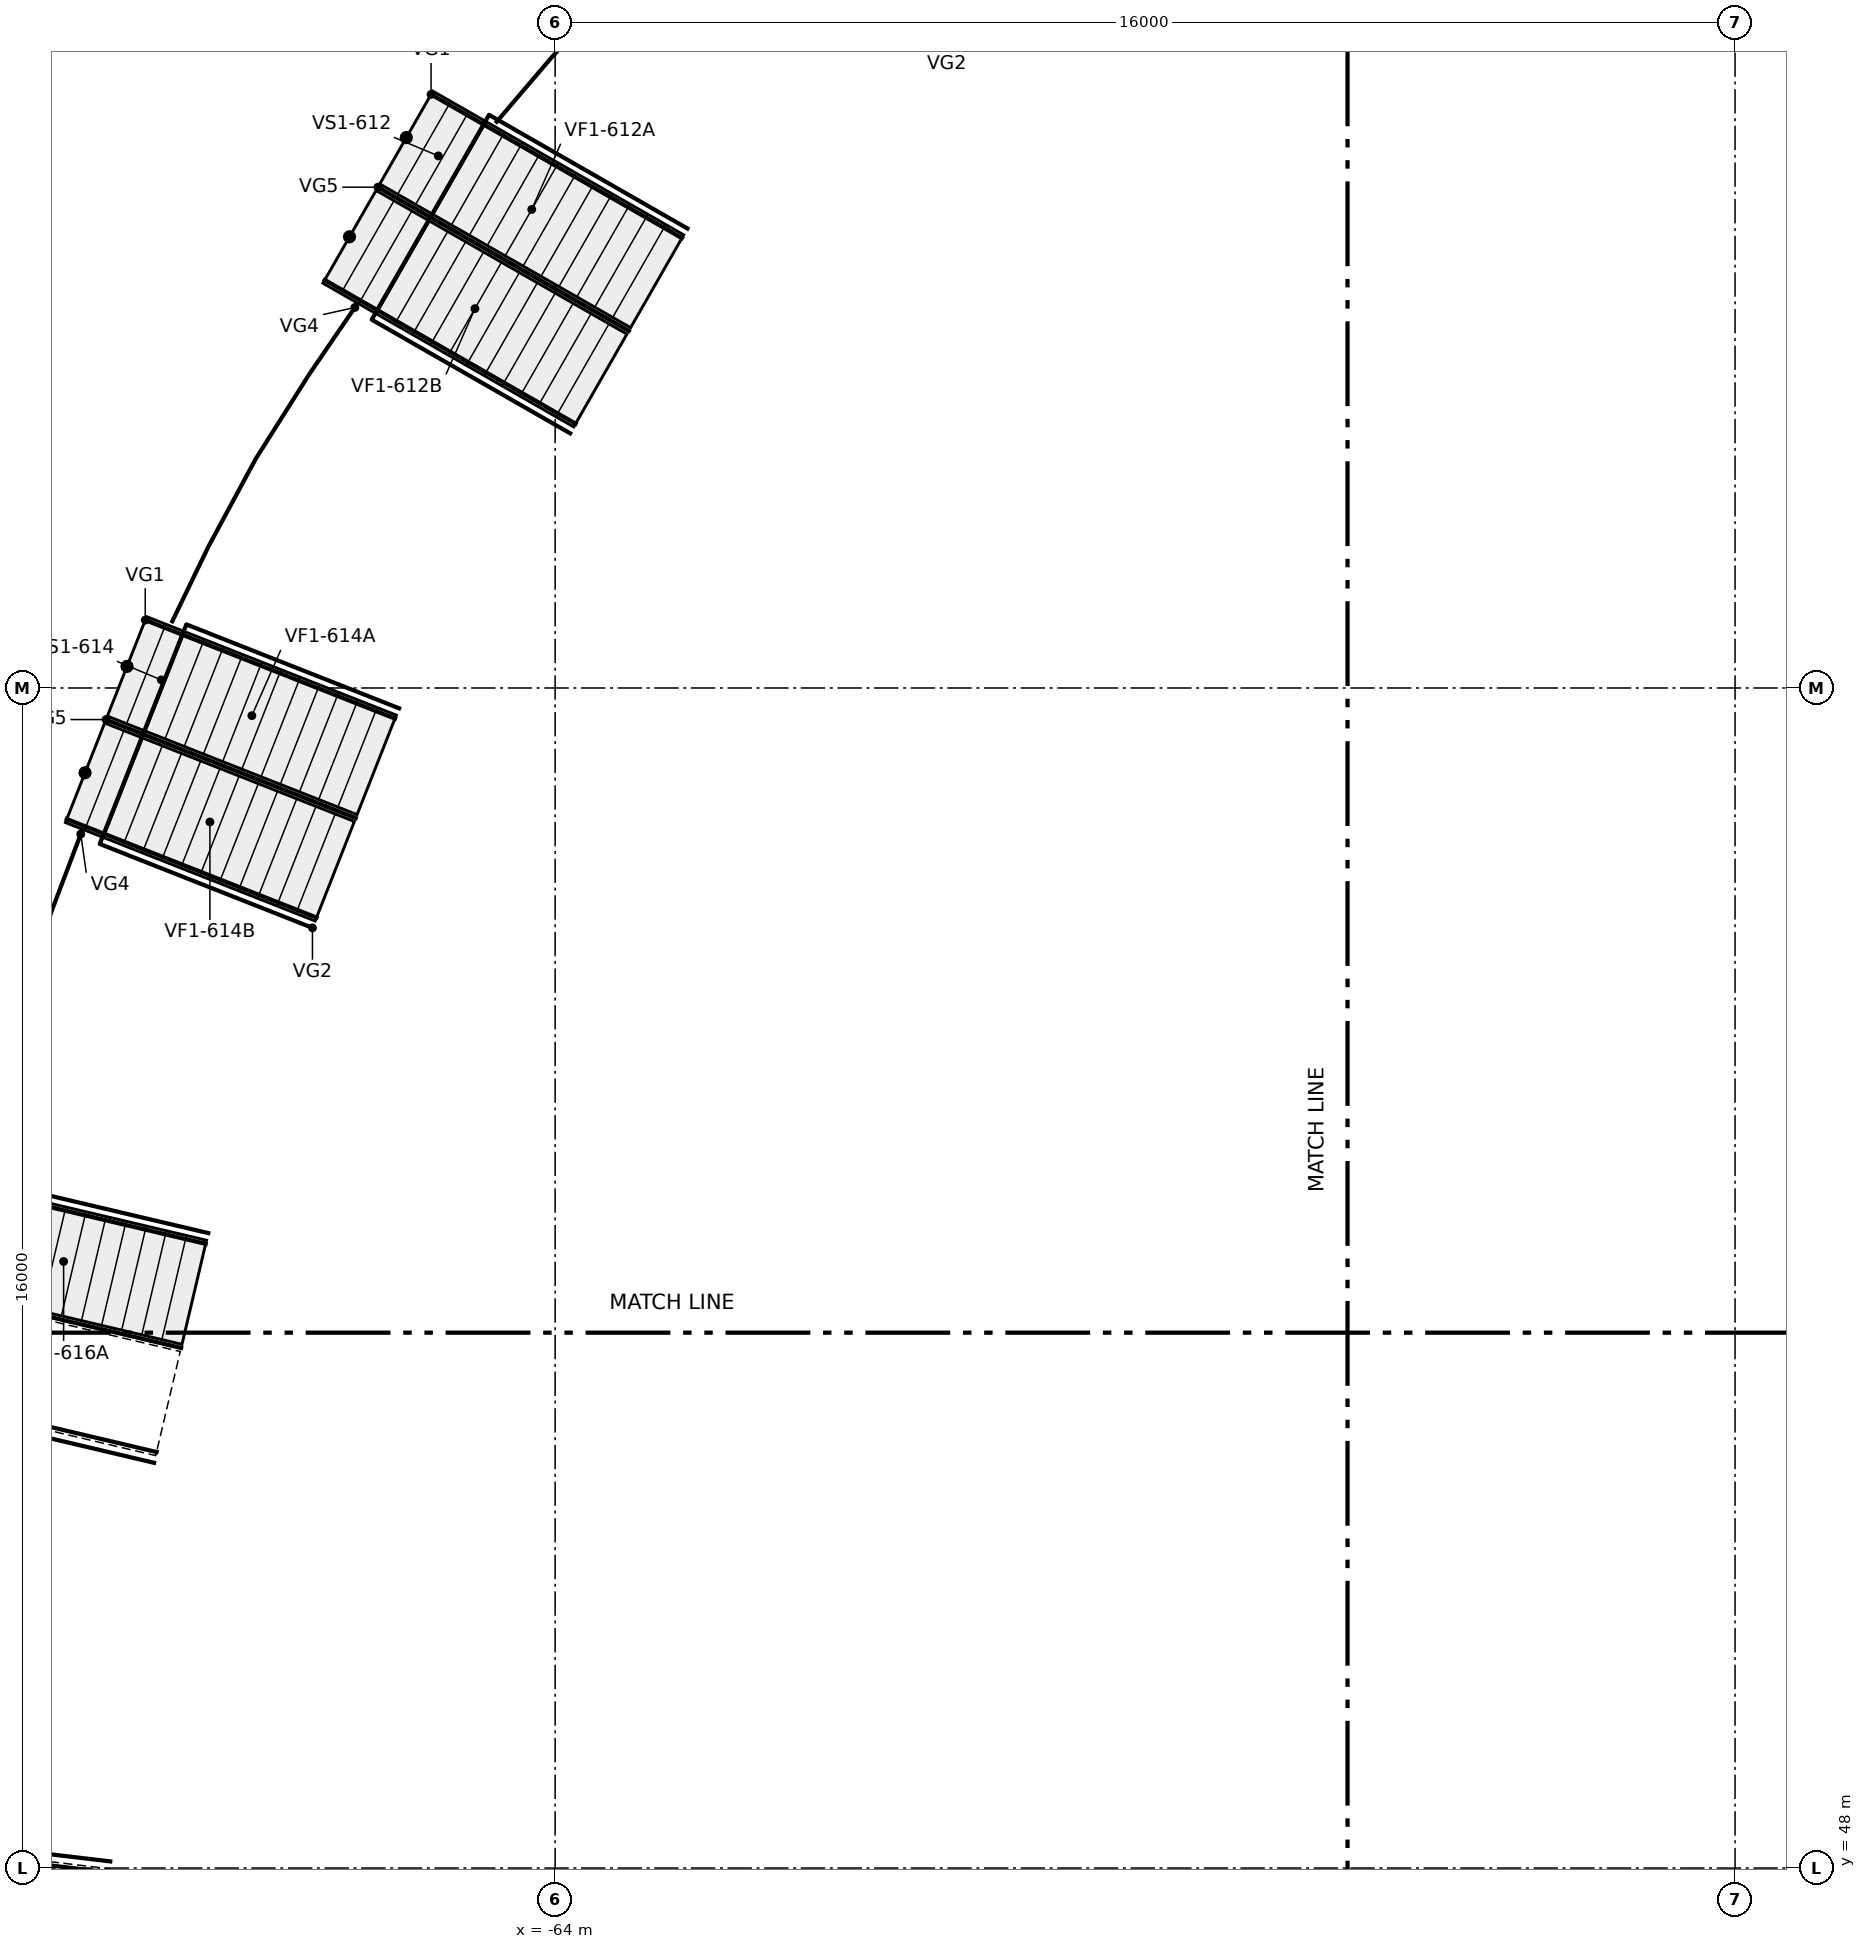
"""IFC4 building model, lengths in metres.
Left out: names, types, materials, properties, quantities, classifications, styles, units other than length and angle.
Written with IfcOpenShell. Run it as: python <this file> out.ifc"""

import sys

from ifc_helpers import new_model, si_unit, direction, frame, origin, origin_2d, place, context, subcontext, project, spatial, circle, extrude, element, save


model = new_model("IFC4")
c1 = context("Model", 3, precision=1e-05, world=origin(), true_north=direction((0.0, 1.0)))
c2 = subcontext(c1, "Body", "Model", "MODEL_VIEW")
j1 = project(units=[si_unit("LENGTHUNIT", "METRE"), si_unit("PLANEANGLEUNIT", "RADIAN")], contexts=[c1])
p1 = place(None, origin())
s1 = spatial("IfcSite", under=j1, at=p1, CompositionType="ELEMENT")
p2 = place(p1, origin())
s2 = spatial("IfcBuilding", under=s1, at=p2, CompositionType="ELEMENT")
p3 = place(p2, frame((0.0, 0.0, 18.0)))
s3 = spatial("IfcBuildingStorey", under=s2, at=p3, CompositionType="ELEMENT", Elevation=18.0)
p4 = place(p3, frame((-67.972, 67.058, 0.0), z_axis=(0.0, 0.0, 1.0), x_axis=(1.0, 0.0, 0.0)))
e1 = element("IfcColumn", 1, at=p4, inside=s3, PredefinedType="COLUMN", context=c2, shape_type="SweptSolid", body=[
    extrude(circle(Radius=0.45, at=origin_2d()), origin(), (0.0, 0.0, 1.0), 3.954),
])
p5 = place(p3, frame((-71.17, 59.677, 0.0), z_axis=(0.0, 0.0, 1.0), x_axis=(1.0, 0.0, 0.0)))
e2 = element("IfcColumn", 2, at=p5, inside=s3, PredefinedType="COLUMN", context=c2, shape_type="SweptSolid", body=[
    extrude(circle(Radius=0.45, at=origin_2d()), origin(), (0.0, 0.0, 1.0), 3.698),
])
save(model, sys.argv[1])
